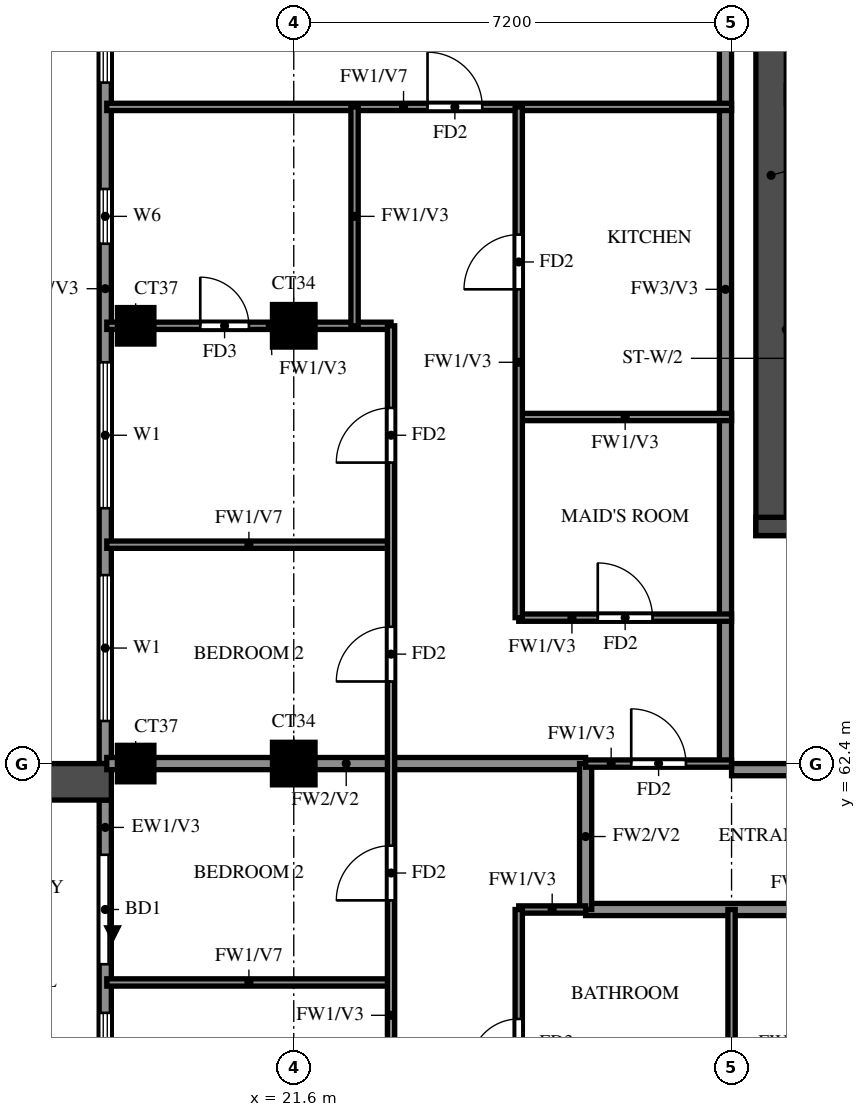
"""IFC4 building model, lengths in metres.
Left out: names, types, materials, properties, quantities, classifications, styles, units other than length and angle.
Written with IfcOpenShell. Run it as: python <this file> out.ifc"""

import sys

from ifc_helpers import new_model, si_unit, direction, frame, frame_2d, origin, origin_2d, place, context, subcontext, project, spatial, rectangle, extrude, source, transform, mapped, element, fill, save


model = new_model("IFC4")
c1 = context("Model", 3, precision=1e-05, world=origin(), true_north=direction((0.0, 1.0)))
c2 = subcontext(c1, "Body", "Model", "MODEL_VIEW")
j1 = project(units=[si_unit("LENGTHUNIT", "METRE"), si_unit("PLANEANGLEUNIT", "RADIAN")], contexts=[c1])
p1 = place(None, origin())
s1 = spatial("IfcSite", under=j1, at=p1, CompositionType="ELEMENT")
p2 = place(p1, origin())
s2 = spatial("IfcBuilding", under=s1, at=p2, CompositionType="ELEMENT")
p3 = place(p2, frame((0.0, 0.0, 264.0)))
s3 = spatial("IfcBuildingStorey", under=s2, at=p3, CompositionType="ELEMENT", Elevation=264.0)
m1 = source(origin(), c2, "Body", "SweptSolid", [
    extrude(rectangle(XDim=0.6, YDim=0.6, at=origin_2d()), origin(), (0.0, 0.0, 1.0), 3.22),
])
p4 = place(p3, frame((19.0, 62.4, 0.0), z_axis=(0.0, 0.0, 1.0), x_axis=(1.0, 0.0, 0.0)))
e1 = element("IfcColumn", 1, at=p4, inside=s3, PredefinedType="COLUMN", context=c2, shape_type="MappedRepresentation", body=[
    mapped(m1, transform((0.0, 0.0, 0.0))),
])
m2 = source(origin(), c2, "Body", "SweptSolid", [
    extrude(rectangle(XDim=0.7, YDim=0.7, at=origin_2d()), origin(), (0.0, 0.0, 1.0), 3.22),
])
p5 = place(p3, frame((21.6, 62.4, 0.0), z_axis=(0.0, 0.0, 1.0), x_axis=(1.0, 0.0, 0.0)))
e2 = element("IfcColumn", 2, at=p5, inside=s3, PredefinedType="COLUMN", context=c2, shape_type="MappedRepresentation", body=[
    mapped(m2, transform((0.0, 0.0, 0.0))),
])
p6 = place(p3, frame((19.0, 69.6, 0.0), z_axis=(0.0, 0.0, 1.0), x_axis=(1.0, 0.0, 0.0)))
e3 = element("IfcColumn", 3, at=p6, inside=s3, PredefinedType="COLUMN", context=c2, shape_type="MappedRepresentation", body=[
    mapped(m1, transform((0.0, 0.0, 0.0))),
])
p7 = place(p3, frame((21.6, 69.6, 0.0), z_axis=(0.0, 0.0, 1.0), x_axis=(1.0, 0.0, 0.0)))
e4 = element("IfcColumn", 4, at=p7, inside=s3, PredefinedType="COLUMN", context=c2, shape_type="MappedRepresentation", body=[
    mapped(m2, transform((0.0, 0.0, 0.0))),
])
p8 = place(p3, frame((29.45, 66.15, 0.0), z_axis=(0.0, 0.0, 1.0), x_axis=(0.0, 1.0, 0.0)))
e5 = element("IfcWall", 5, at=p8, inside=s3, PredefinedType="SHEAR", context=c2, shape_type="SweptSolid", body=[
    extrude(rectangle(XDim=11.85, YDim=0.5, at=frame_2d((5.925, 0.0))), origin(), (0.0, 0.0, 1.0), 3.22),
])
p9 = place(p3, frame((29.2, 66.3, 0.0), z_axis=(0.0, 0.0, 1.0), x_axis=(1.0, 0.0, 0.0)))
e6 = element("IfcWall", 6, at=p9, inside=s3, PredefinedType="SHEAR", context=c2, shape_type="SweptSolid", body=[
    extrude(rectangle(XDim=42.4, YDim=0.3, at=frame_2d((21.2, 0.0))), origin(), (0.0, 0.0, 1.0), 3.22),
])
p10 = place(p9, frame((1.425, 0.0, 0.0)))
e7 = element("IfcOpeningElement", 7, at=p10, cuts=e6, PredefinedType="OPENING", context=c2, shape_type="SweptSolid", body=[
    extrude(rectangle(XDim=1.1, YDim=2.1, at=frame_2d((0.55, 1.05))), frame((0.0, 0.16, 0.0), z_axis=(0.0, -1.0, 0.0), x_axis=(1.0, 0.0, 0.0)), (0.0, 0.0, 1.0), 0.32),
])
p11 = place(p9, frame((4.2, 0.0, 0.0)))
e8 = element("IfcOpeningElement", 8, at=p11, cuts=e6, PredefinedType="OPENING", context=c2, shape_type="SweptSolid", body=[
    extrude(rectangle(XDim=1.8, YDim=2.1, at=frame_2d((0.9, 1.05))), frame((0.0, 0.16, 0.0), z_axis=(0.0, -1.0, 0.0), x_axis=(1.0, 0.0, 0.0)), (0.0, 0.0, 1.0), 0.32),
])
p12 = place(p3, frame((18.5, 76.6, 0.0), z_axis=(0.0, 0.0, 1.0), x_axis=(0.0, -1.0, 0.0)))
e9 = element("IfcWall", 9, at=p12, inside=s3, PredefinedType="SOLIDWALL", context=c2, shape_type="SweptSolid", body=[
    extrude(rectangle(XDim=14.2, YDim=0.2, at=frame_2d((7.1, 0.0))), origin(), (0.0, 0.0, 1.0), 3.22),
])
p13 = place(p12, frame((11.1, 0.0, 0.6)))
e10 = element("IfcOpeningElement", 10, at=p13, cuts=e9, PredefinedType="OPENING", context=c2, shape_type="SweptSolid", body=[
    extrude(rectangle(XDim=2.4, YDim=2.4, at=frame_2d((1.2, 1.2))), frame((0.0, 0.11, 0.0), z_axis=(0.0, -1.0, 0.0), x_axis=(1.0, 0.0, 0.0)), (0.0, 0.0, 1.0), 0.22),
])
p14 = place(p12, frame((7.6, 0.0, 0.6)))
e11 = element("IfcOpeningElement", 11, at=p14, cuts=e9, PredefinedType="OPENING", context=c2, shape_type="SweptSolid", body=[
    extrude(rectangle(XDim=2.4, YDim=2.4, at=frame_2d((1.2, 1.2))), frame((0.0, 0.11, 0.0), z_axis=(0.0, -1.0, 0.0), x_axis=(1.0, 0.0, 0.0)), (0.0, 0.0, 1.0), 0.22),
])
p15 = place(p12, frame((4.75, 0.0, 1.5)))
e12 = element("IfcOpeningElement", 12, at=p15, cuts=e9, PredefinedType="OPENING", context=c2, shape_type="SweptSolid", body=[
    extrude(rectangle(XDim=0.9, YDim=0.9, at=frame_2d((0.45, 0.45))), frame((0.0, 0.11, 0.0), z_axis=(0.0, -1.0, 0.0), x_axis=(1.0, 0.0, 0.0)), (0.0, 0.0, 1.0), 0.22),
])
p16 = place(p12, frame((0.6, 0.0, 0.6)))
e13 = element("IfcOpeningElement", 13, at=p16, cuts=e9, PredefinedType="OPENING", context=c2, shape_type="SweptSolid", body=[
    extrude(rectangle(XDim=2.4, YDim=2.4, at=frame_2d((1.2, 1.2))), frame((0.0, 0.11, 0.0), z_axis=(0.0, -1.0, 0.0), x_axis=(1.0, 0.0, 0.0)), (0.0, 0.0, 1.0), 0.22),
])
p17 = place(p3, frame((18.5, 61.8, 0.0), z_axis=(0.0, 0.0, 1.0), x_axis=(0.0, -1.0, 0.0)))
e14 = element("IfcWall", 14, at=p17, inside=s3, PredefinedType="SOLIDWALL", context=c2, shape_type="SweptSolid", body=[
    extrude(rectangle(XDim=6.0, YDim=0.2, at=frame_2d((3.0, 0.0))), origin(), (0.0, 0.0, 1.0), 3.22),
])
p18 = place(p17, frame((0.9, 0.0, 0.0)))
e15 = element("IfcOpeningElement", 15, at=p18, cuts=e14, PredefinedType="OPENING", context=c2, shape_type="SweptSolid", body=[
    extrude(rectangle(XDim=1.8, YDim=2.4, at=frame_2d((0.9, 1.2))), frame((0.0, 0.11, 0.0), z_axis=(0.0, -1.0, 0.0), x_axis=(1.0, 0.0, 0.0)), (0.0, 0.0, 1.0), 0.22),
])
p19 = place(p17, frame((3.5, 0.0, 0.6)))
e16 = element("IfcOpeningElement", 16, at=p19, cuts=e14, PredefinedType="OPENING", context=c2, shape_type="SweptSolid", body=[
    extrude(rectangle(XDim=1.8, YDim=2.4, at=frame_2d((0.9, 1.2))), frame((0.0, 0.11, 0.0), z_axis=(0.0, -1.0, 0.0), x_axis=(1.0, 0.0, 0.0)), (0.0, 0.0, 1.0), 0.22),
])
p20 = place(p3, frame((18.6, 62.1, 0.0), z_axis=(0.0, 0.0, 1.0), x_axis=(-1.0, 0.0, 0.0)))
e17 = element("IfcWall", 17, at=p20, inside=s3, PredefinedType="SOLIDWALL", context=c2, shape_type="SweptSolid", body=[
    extrude(rectangle(XDim=2.9, YDim=0.6, at=frame_2d((1.45, 0.0))), origin(), (0.0, 0.0, 1.0), 2.85),
])
p21 = place(p3, frame((28.8, 62.3, 0.0), z_axis=(0.0, 0.0, 1.0), x_axis=(1.0, 0.0, 0.0)))
e18 = element("IfcWall", 18, at=p21, inside=s3, PredefinedType="SOLIDWALL", context=c2, shape_type="SweptSolid", body=[
    extrude(rectangle(XDim=4.8, YDim=0.2, at=frame_2d((2.4, 0.0))), origin(), (0.0, 0.0, 1.0), 3.22),
])
p22 = place(p3, frame((28.7, 62.4, 0.0), z_axis=(0.0, 0.0, 1.0), x_axis=(0.0, 1.0, 0.0)))
e19 = element("IfcWall", 19, at=p22, inside=s3, PredefinedType="SOLIDWALL", context=c2, shape_type="SweptSolid", body=[
    extrude(rectangle(XDim=15.6, YDim=0.2, at=frame_2d((7.8, 0.0))), origin(), (0.0, 0.0, 1.0), 3.22),
])
p23 = place(p3, frame((26.4, 60.0, 0.0), z_axis=(0.0, 0.0, 1.0), x_axis=(1.0, 0.0, 0.0)))
e20 = element("IfcWall", 20, at=p23, inside=s3, PredefinedType="SOLIDWALL", context=c2, shape_type="SweptSolid", body=[
    extrude(rectangle(XDim=7.2, YDim=0.2, at=frame_2d((3.6, 0.0))), origin(), (0.0, 0.0, 1.0), 3.22),
])
p24 = place(p3, frame((18.525, 62.4, 0.0), z_axis=(0.0, 0.0, 1.0), x_axis=(1.0, 0.0, 0.0)))
e21 = element("IfcWall", 21, at=p24, inside=s3, PredefinedType="SOLIDWALL", context=c2, shape_type="SweptSolid", body=[
    extrude(rectangle(XDim=7.875, YDim=0.2, at=frame_2d((3.938, 0.0))), origin(), (0.0, 0.0, 1.0), 3.22),
])
p25 = place(p3, frame((26.4, 60.0, 0.0), z_axis=(0.0, 0.0, 1.0), x_axis=(0.0, 1.0, 0.0)))
e22 = element("IfcWall", 22, at=p25, inside=s3, PredefinedType="SOLIDWALL", context=c2, shape_type="SweptSolid", body=[
    extrude(rectangle(XDim=2.4, YDim=0.2, at=frame_2d((1.2, 0.0))), origin(), (0.0, 0.0, 1.0), 3.22),
])
p26 = place(p3, frame((18.525, 58.8, 0.0), z_axis=(0.0, 0.0, 1.0), x_axis=(1.0, 0.0, 0.0)))
e23 = element("IfcWall", 23, at=p26, inside=s3, PredefinedType="PARTITIONING", context=c2, shape_type="SweptSolid", body=[
    extrude(rectangle(XDim=4.675, YDim=0.12, at=frame_2d((2.337, 0.0))), origin(), (0.0, 0.0, 1.0), 2.32),
])
p27 = place(p3, frame((25.3, 60.0, 0.0), z_axis=(0.0, 0.0, 1.0), x_axis=(1.0, 0.0, 0.0)))
e24 = element("IfcWall", 24, at=p27, inside=s3, PredefinedType="PARTITIONING", context=c2, shape_type="SweptSolid", body=[
    extrude(rectangle(XDim=1.1, YDim=0.12, at=frame_2d((0.55, 0.0))), origin(), (0.0, 0.0, 1.0), 3.22),
])
p28 = place(p3, frame((26.4, 62.4, 0.0), z_axis=(0.0, 0.0, 1.0), x_axis=(1.0, 0.0, 0.0)))
e25 = element("IfcWall", 25, at=p28, inside=s3, PredefinedType="PARTITIONING", context=c2, shape_type="SweptSolid", body=[
    extrude(rectangle(XDim=2.4, YDim=0.12, at=frame_2d((1.2, 0.0))), origin(), (0.0, 0.0, 1.0), 3.22),
])
p29 = place(p28, frame((0.75, 0.0, 0.0)))
e26 = element("IfcOpeningElement", 26, at=p29, cuts=e25, PredefinedType="OPENING", context=c2, shape_type="SweptSolid", body=[
    extrude(rectangle(XDim=0.9, YDim=2.1, at=frame_2d((0.45, 1.05))), frame((0.0, 0.07, 0.0), z_axis=(0.0, -1.0, 0.0), x_axis=(1.0, 0.0, 0.0)), (0.0, 0.0, 1.0), 0.14),
])
p30 = place(p3, frame((25.3, 64.8, 0.0), z_axis=(0.0, 0.0, 1.0), x_axis=(1.0, 0.0, 0.0)))
e27 = element("IfcWall", 27, at=p30, inside=s3, PredefinedType="PARTITIONING", context=c2, shape_type="SweptSolid", body=[
    extrude(rectangle(XDim=3.5, YDim=0.12, at=frame_2d((1.75, 0.0))), origin(), (0.0, 0.0, 1.0), 3.22),
])
p31 = place(p30, frame((1.3, 0.0, 0.0)))
e28 = element("IfcOpeningElement", 28, at=p31, cuts=e27, PredefinedType="OPENING", context=c2, shape_type="SweptSolid", body=[
    extrude(rectangle(XDim=0.9, YDim=2.1, at=frame_2d((0.45, 1.05))), frame((0.0, 0.07, 0.0), z_axis=(0.0, -1.0, 0.0), x_axis=(1.0, 0.0, 0.0)), (0.0, 0.0, 1.0), 0.14),
])
p32 = place(p3, frame((18.525, 66.0, 0.0), z_axis=(0.0, 0.0, 1.0), x_axis=(1.0, 0.0, 0.0)))
e29 = element("IfcWall", 29, at=p32, inside=s3, PredefinedType="PARTITIONING", context=c2, shape_type="SweptSolid", body=[
    extrude(rectangle(XDim=4.675, YDim=0.12, at=frame_2d((2.337, 0.0))), origin(), (0.0, 0.0, 1.0), 2.32),
])
p33 = place(p3, frame((25.3, 68.1, 0.0), z_axis=(0.0, 0.0, 1.0), x_axis=(1.0, 0.0, 0.0)))
e30 = element("IfcWall", 30, at=p33, inside=s3, PredefinedType="PARTITIONING", context=c2, shape_type="SweptSolid", body=[
    extrude(rectangle(XDim=3.5, YDim=0.12, at=frame_2d((1.75, 0.0))), origin(), (0.0, 0.0, 1.0), 3.22),
])
p34 = place(p3, frame((18.525, 69.6, 0.0), z_axis=(0.0, 0.0, 1.0), x_axis=(1.0, 0.0, 0.0)))
e31 = element("IfcWall", 31, at=p34, inside=s3, PredefinedType="PARTITIONING", context=c2, shape_type="SweptSolid", body=[
    extrude(rectangle(XDim=4.675, YDim=0.12, at=frame_2d((2.337, 0.0))), origin(), (0.0, 0.0, 1.0), 3.22),
])
p35 = place(p34, frame((1.538, 0.0, 0.0)))
e32 = element("IfcOpeningElement", 32, at=p35, cuts=e31, PredefinedType="OPENING", context=c2, shape_type="SweptSolid", body=[
    extrude(rectangle(XDim=0.8, YDim=2.1, at=frame_2d((0.4, 1.05))), frame((0.0, 0.07, 0.0), z_axis=(0.0, -1.0, 0.0), x_axis=(1.0, 0.0, 0.0)), (0.0, 0.0, 1.0), 0.14),
])
p36 = place(p3, frame((18.525, 73.2, 0.0), z_axis=(0.0, 0.0, 1.0), x_axis=(1.0, 0.0, 0.0)))
e33 = element("IfcWall", 33, at=p36, inside=s3, PredefinedType="PARTITIONING", context=c2, shape_type="SweptSolid", body=[
    extrude(rectangle(XDim=10.275, YDim=0.12, at=frame_2d((5.138, 0.0))), origin(), (0.0, 0.0, 1.0), 2.32),
])
p37 = place(p36, frame((5.275, 0.0, 0.0)))
e34 = element("IfcOpeningElement", 34, at=p37, cuts=e33, PredefinedType="OPENING", context=c2, shape_type="SweptSolid", body=[
    extrude(rectangle(XDim=0.9, YDim=2.1, at=frame_2d((0.45, 1.05))), frame((0.0, 0.07, 0.0), z_axis=(0.0, -1.0, 0.0), x_axis=(1.0, 0.0, 0.0)), (0.0, 0.0, 1.0), 0.14),
])
p38 = place(p3, frame((22.6, 69.6, 0.0), z_axis=(0.0, 0.0, 1.0), x_axis=(0.0, 1.0, 0.0)))
e35 = element("IfcWall", 35, at=p38, inside=s3, PredefinedType="PARTITIONING", context=c2, shape_type="SweptSolid", body=[
    extrude(rectangle(XDim=3.6, YDim=0.12, at=frame_2d((1.8, 0.0))), origin(), (0.0, 0.0, 1.0), 3.22),
])
p39 = place(p3, frame((23.2, 48.0, 0.0), z_axis=(0.0, 0.0, 1.0), x_axis=(0.0, 1.0, 0.0)))
e36 = element("IfcWall", 36, at=p39, inside=s3, PredefinedType="PARTITIONING", context=c2, shape_type="SweptSolid", body=[
    extrude(rectangle(XDim=21.6, YDim=0.12, at=frame_2d((10.8, 0.0))), origin(), (0.0, 0.0, 1.0), 3.22),
])
p40 = place(p39, frame((1.35, 0.0, 0.0)))
e37 = element("IfcOpeningElement", 37, at=p40, cuts=e36, PredefinedType="OPENING", context=c2, shape_type="SweptSolid", body=[
    extrude(rectangle(XDim=0.9, YDim=2.1, at=frame_2d((0.45, 1.05))), frame((0.0, 0.07, 0.0), z_axis=(0.0, -1.0, 0.0), x_axis=(1.0, 0.0, 0.0)), (0.0, 0.0, 1.0), 0.14),
])
p41 = place(p39, frame((7.95, 0.0, 0.0)))
e38 = element("IfcOpeningElement", 38, at=p41, cuts=e36, PredefinedType="OPENING", context=c2, shape_type="SweptSolid", body=[
    extrude(rectangle(XDim=1.5, YDim=2.1, at=frame_2d((0.75, 1.05))), frame((0.0, 0.07, 0.0), z_axis=(0.0, -1.0, 0.0), x_axis=(1.0, 0.0, 0.0)), (0.0, 0.0, 1.0), 0.14),
])
p42 = place(p39, frame((12.15, 0.0, 0.0)))
e39 = element("IfcOpeningElement", 39, at=p42, cuts=e36, PredefinedType="OPENING", context=c2, shape_type="SweptSolid", body=[
    extrude(rectangle(XDim=0.9, YDim=2.1, at=frame_2d((0.45, 1.05))), frame((0.0, 0.07, 0.0), z_axis=(0.0, -1.0, 0.0), x_axis=(1.0, 0.0, 0.0)), (0.0, 0.0, 1.0), 0.14),
])
p43 = place(p39, frame((15.75, 0.0, 0.0)))
e40 = element("IfcOpeningElement", 40, at=p43, cuts=e36, PredefinedType="OPENING", context=c2, shape_type="SweptSolid", body=[
    extrude(rectangle(XDim=0.9, YDim=2.1, at=frame_2d((0.45, 1.05))), frame((0.0, 0.07, 0.0), z_axis=(0.0, -1.0, 0.0), x_axis=(1.0, 0.0, 0.0)), (0.0, 0.0, 1.0), 0.14),
])
p44 = place(p39, frame((19.35, 0.0, 0.0)))
e41 = element("IfcOpeningElement", 41, at=p44, cuts=e36, PredefinedType="OPENING", context=c2, shape_type="SweptSolid", body=[
    extrude(rectangle(XDim=0.9, YDim=2.1, at=frame_2d((0.45, 1.05))), frame((0.0, 0.07, 0.0), z_axis=(0.0, -1.0, 0.0), x_axis=(1.0, 0.0, 0.0)), (0.0, 0.0, 1.0), 0.14),
])
p45 = place(p3, frame((25.3, 55.6, 0.0), z_axis=(0.0, 0.0, 1.0), x_axis=(0.0, 1.0, 0.0)))
e42 = element("IfcWall", 42, at=p45, inside=s3, PredefinedType="PARTITIONING", context=c2, shape_type="SweptSolid", body=[
    extrude(rectangle(XDim=4.4, YDim=0.12, at=frame_2d((2.2, 0.0))), origin(), (0.0, 0.0, 1.0), 3.22),
])
p46 = place(p45, frame((1.8, 0.0, 0.0)))
e43 = element("IfcOpeningElement", 43, at=p46, cuts=e42, PredefinedType="OPENING", context=c2, shape_type="SweptSolid", body=[
    extrude(rectangle(XDim=0.8, YDim=2.1, at=frame_2d((0.4, 1.05))), frame((0.0, 0.07, 0.0), z_axis=(0.0, -1.0, 0.0), x_axis=(1.0, 0.0, 0.0)), (0.0, 0.0, 1.0), 0.14),
])
p47 = place(p3, frame((25.3, 64.8, 0.0), z_axis=(0.0, 0.0, 1.0), x_axis=(0.0, 1.0, 0.0)))
e44 = element("IfcWall", 44, at=p47, inside=s3, PredefinedType="PARTITIONING", context=c2, shape_type="SweptSolid", body=[
    extrude(rectangle(XDim=8.4, YDim=0.12, at=frame_2d((4.2, 0.0))), origin(), (0.0, 0.0, 1.0), 3.22),
])
p48 = place(p47, frame((5.4, 0.0, 0.0)))
e45 = element("IfcOpeningElement", 45, at=p48, cuts=e44, PredefinedType="OPENING", context=c2, shape_type="SweptSolid", body=[
    extrude(rectangle(XDim=0.9, YDim=2.1, at=frame_2d((0.45, 1.05))), frame((0.0, 0.07, 0.0), z_axis=(0.0, -1.0, 0.0), x_axis=(1.0, 0.0, 0.0)), (0.0, 0.0, 1.0), 0.14),
])
p49 = place(p3, frame((28.8, 55.6, 0.0), z_axis=(0.0, 0.0, 1.0), x_axis=(0.0, 1.0, 0.0)))
e46 = element("IfcWall", 46, at=p49, inside=s3, PredefinedType="PARTITIONING", context=c2, shape_type="SweptSolid", body=[
    extrude(rectangle(XDim=4.4, YDim=0.12, at=frame_2d((2.2, 0.0))), origin(), (0.0, 0.0, 1.0), 3.22),
])
p50 = place(p13, origin())
e47 = element("IfcWindow", 47, at=p50, inside=s3, PartitioningType="DOUBLE_PANEL_VERTICAL", PredefinedType="WINDOW", context=c2, shape_type="SweptSolid", body=[
    extrude(rectangle(XDim=2.4, YDim=2.4, at=frame_2d((1.2, 1.2))), frame((0.0, 0.03, 0.0), z_axis=(0.0, -1.0, 0.0), x_axis=(1.0, 0.0, 0.0)), (0.0, 0.0, 1.0), 0.06),
])
fill(e10, e47)
p51 = place(p14, origin())
e48 = element("IfcWindow", 48, at=p51, inside=s3, PartitioningType="DOUBLE_PANEL_VERTICAL", PredefinedType="WINDOW", context=c2, shape_type="SweptSolid", body=[
    extrude(rectangle(XDim=2.4, YDim=2.4, at=frame_2d((1.2, 1.2))), frame((0.0, 0.03, 0.0), z_axis=(0.0, -1.0, 0.0), x_axis=(1.0, 0.0, 0.0)), (0.0, 0.0, 1.0), 0.06),
])
fill(e11, e48)
p52 = place(p15, origin())
e49 = element("IfcWindow", 49, at=p52, inside=s3, PartitioningType="SINGLE_PANEL", PredefinedType="WINDOW", context=c2, shape_type="SweptSolid", body=[
    extrude(rectangle(XDim=0.9, YDim=0.9, at=frame_2d((0.45, 0.45))), frame((0.0, 0.03, 0.0), z_axis=(0.0, -1.0, 0.0), x_axis=(1.0, 0.0, 0.0)), (0.0, 0.0, 1.0), 0.06),
])
fill(e12, e49)
p53 = place(p16, origin())
e50 = element("IfcWindow", 50, at=p53, inside=s3, PartitioningType="DOUBLE_PANEL_VERTICAL", PredefinedType="WINDOW", context=c2, shape_type="SweptSolid", body=[
    extrude(rectangle(XDim=2.4, YDim=2.4, at=frame_2d((1.2, 1.2))), frame((0.0, 0.03, 0.0), z_axis=(0.0, -1.0, 0.0), x_axis=(1.0, 0.0, 0.0)), (0.0, 0.0, 1.0), 0.06),
])
fill(e13, e50)
p54 = place(p18, origin())
e51 = element("IfcDoor", 51, at=p54, inside=s3, OperationType="DOUBLE_DOOR_SLIDING", PredefinedType="DOOR", context=c2, shape_type="SweptSolid", body=[
    extrude(rectangle(XDim=1.8, YDim=2.4, at=frame_2d((0.9, 1.2))), frame((0.0, 0.025, 0.0), z_axis=(0.0, -1.0, 0.0), x_axis=(1.0, 0.0, 0.0)), (0.0, 0.0, 1.0), 0.05),
])
fill(e15, e51)
p55 = place(p19, origin())
e52 = element("IfcWindow", 52, at=p55, inside=s3, PartitioningType="DOUBLE_PANEL_VERTICAL", PredefinedType="WINDOW", context=c2, shape_type="SweptSolid", body=[
    extrude(rectangle(XDim=1.8, YDim=2.4, at=frame_2d((0.9, 1.2))), frame((0.0, 0.03, 0.0), z_axis=(0.0, -1.0, 0.0), x_axis=(1.0, 0.0, 0.0)), (0.0, 0.0, 1.0), 0.06),
])
fill(e16, e52)
p56 = place(p42, origin())
e53 = element("IfcDoor", 53, at=p56, inside=s3, OperationType="SINGLE_SWING_LEFT", PredefinedType="DOOR", context=c2, shape_type="SweptSolid", body=[
    extrude(rectangle(XDim=0.9, YDim=2.1, at=frame_2d((0.45, 1.05))), frame((0.0, 0.025, 0.0), z_axis=(0.0, -1.0, 0.0), x_axis=(1.0, 0.0, 0.0)), (0.0, 0.0, 1.0), 0.05),
])
fill(e39, e53)
p57 = place(p46, origin())
e54 = element("IfcDoor", 54, at=p57, inside=s3, OperationType="SINGLE_SWING_LEFT", PredefinedType="DOOR", context=c2, shape_type="SweptSolid", body=[
    extrude(rectangle(XDim=0.8, YDim=2.1, at=frame_2d((0.4, 1.05))), frame((0.0, 0.025, 0.0), z_axis=(0.0, -1.0, 0.0), x_axis=(1.0, 0.0, 0.0)), (0.0, 0.0, 1.0), 0.05),
])
fill(e43, e54)
p58 = place(p29, origin())
e55 = element("IfcDoor", 55, at=p58, inside=s3, OperationType="SINGLE_SWING_LEFT", PredefinedType="DOOR", context=c2, shape_type="SweptSolid", body=[
    extrude(rectangle(XDim=0.9, YDim=2.1, at=frame_2d((0.45, 1.05))), frame((0.0, 0.025, 0.0), z_axis=(0.0, -1.0, 0.0), x_axis=(1.0, 0.0, 0.0)), (0.0, 0.0, 1.0), 0.05),
])
fill(e26, e55)
p59 = place(p43, origin())
e56 = element("IfcDoor", 56, at=p59, inside=s3, OperationType="SINGLE_SWING_LEFT", PredefinedType="DOOR", context=c2, shape_type="SweptSolid", body=[
    extrude(rectangle(XDim=0.9, YDim=2.1, at=frame_2d((0.45, 1.05))), frame((0.0, 0.025, 0.0), z_axis=(0.0, -1.0, 0.0), x_axis=(1.0, 0.0, 0.0)), (0.0, 0.0, 1.0), 0.05),
])
fill(e40, e56)
p60 = place(p44, origin())
e57 = element("IfcDoor", 57, at=p60, inside=s3, OperationType="SINGLE_SWING_LEFT", PredefinedType="DOOR", context=c2, shape_type="SweptSolid", body=[
    extrude(rectangle(XDim=0.9, YDim=2.1, at=frame_2d((0.45, 1.05))), frame((0.0, 0.025, 0.0), z_axis=(0.0, -1.0, 0.0), x_axis=(1.0, 0.0, 0.0)), (0.0, 0.0, 1.0), 0.05),
])
fill(e41, e57)
p61 = place(p35, origin())
e58 = element("IfcDoor", 58, at=p61, inside=s3, OperationType="SINGLE_SWING_LEFT", PredefinedType="DOOR", context=c2, shape_type="SweptSolid", body=[
    extrude(rectangle(XDim=0.8, YDim=2.1, at=frame_2d((0.4, 1.05))), frame((0.0, 0.025, 0.0), z_axis=(0.0, -1.0, 0.0), x_axis=(1.0, 0.0, 0.0)), (0.0, 0.0, 1.0), 0.05),
])
fill(e32, e58)
p62 = place(p37, origin())
e59 = element("IfcDoor", 59, at=p62, inside=s3, OperationType="SINGLE_SWING_LEFT", PredefinedType="DOOR", context=c2, shape_type="SweptSolid", body=[
    extrude(rectangle(XDim=0.9, YDim=2.1, at=frame_2d((0.45, 1.05))), frame((0.0, 0.025, 0.0), z_axis=(0.0, -1.0, 0.0), x_axis=(1.0, 0.0, 0.0)), (0.0, 0.0, 1.0), 0.05),
])
fill(e34, e59)
p63 = place(p31, origin())
e60 = element("IfcDoor", 60, at=p63, inside=s3, OperationType="SINGLE_SWING_LEFT", PredefinedType="DOOR", context=c2, shape_type="SweptSolid", body=[
    extrude(rectangle(XDim=0.9, YDim=2.1, at=frame_2d((0.45, 1.05))), frame((0.0, 0.025, 0.0), z_axis=(0.0, -1.0, 0.0), x_axis=(1.0, 0.0, 0.0)), (0.0, 0.0, 1.0), 0.05),
])
fill(e28, e60)
p64 = place(p48, origin())
e61 = element("IfcDoor", 61, at=p64, inside=s3, OperationType="SINGLE_SWING_RIGHT", PredefinedType="DOOR", context=c2, shape_type="SweptSolid", body=[
    extrude(rectangle(XDim=0.9, YDim=2.1, at=frame_2d((0.45, 1.05))), frame((0.0, 0.025, 0.0), z_axis=(0.0, -1.0, 0.0), x_axis=(1.0, 0.0, 0.0)), (0.0, 0.0, 1.0), 0.05),
])
fill(e45, e61)
save(model, sys.argv[1])
